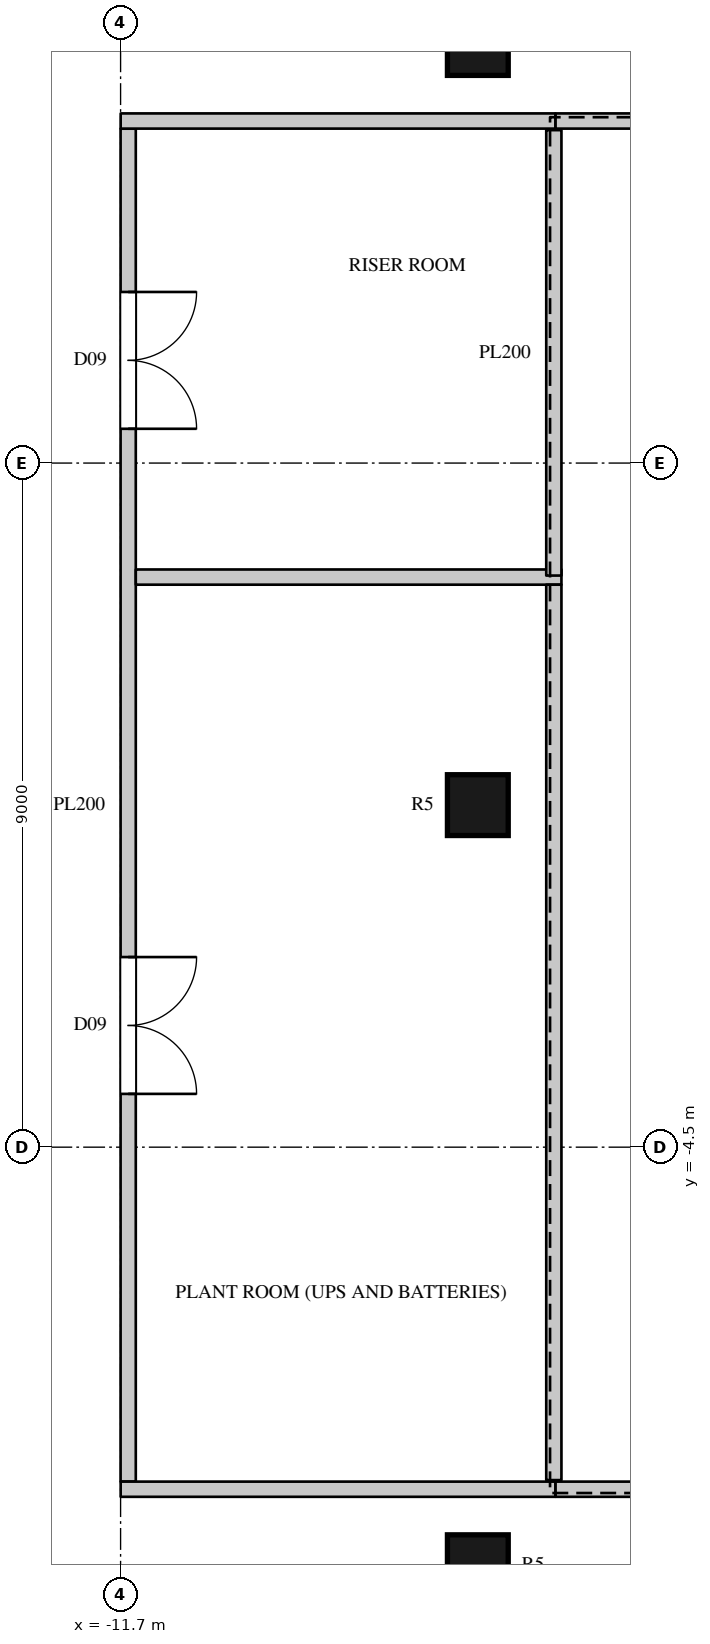
"""IFC4 building model, lengths in metres.
Left out: names, types, materials, properties, quantities, classifications, styles, units other than length and angle.
Written with IfcOpenShell. Run it as: python <this file> out.ifc"""

import sys

from ifc_helpers import new_model, si_unit, direction, frame, frame_2d, origin, origin_2d, place, context, subcontext, project, spatial, rectangle, circle, extrude, element, fill, save


model = new_model("IFC4")
c1 = context("Model", 3, precision=1e-05, world=origin(), true_north=direction((0.0, 1.0)))
c2 = subcontext(c1, "Body", "Model", "MODEL_VIEW")
j1 = project(units=[si_unit("LENGTHUNIT", "METRE"), si_unit("PLANEANGLEUNIT", "RADIAN")], contexts=[c1])
p1 = place(None, origin())
s1 = spatial("IfcSite", under=j1, at=p1, CompositionType="ELEMENT")
p2 = place(p1, origin())
s2 = spatial("IfcBuilding", under=s1, at=p2, CompositionType="ELEMENT")
p3 = place(p2, frame((0.0, 0.0, 351.0)))
s3 = spatial("IfcBuildingStorey", under=s2, at=p3, CompositionType="ELEMENT", Elevation=351.0)
for number, where, z_axis, x_axis in (
    (1, (-7.0, -10.0, 0.0), (0.0, 0.0, 1.0), (1.0, 0.0, 0.0)),
    (2, (-7.0, 0.0, 0.0), (0.0, 0.0, 1.0), (1.0, 0.0, 0.0)),
    (3, (-7.0, 10.0, 0.0), (0.0, 0.0, 1.0), (1.0, 0.0, 0.0)),
):
    element("IfcColumn", number, at=place(p3, frame(where, z_axis=z_axis, x_axis=x_axis)), inside=s3, PredefinedType="COLUMN", context=c2, shape_type="SweptSolid", body=[
        extrude(circle(Radius=0.4, at=origin_2d()), origin(), (0.0, 0.0, 1.0), 4.0),
    ])
for number, where, z_axis, x_axis in (
    (4, (-5.98, -9.0, 0.0), (0.0, 0.0, 1.0), (1.0, 0.0, 0.0)),
    (5, (-5.98, 9.0, 0.0), (0.0, 0.0, 1.0), (1.0, 0.0, 0.0)),
):
    element("IfcWall", number, at=place(p3, frame(where, z_axis=z_axis, x_axis=x_axis)), inside=s3, PredefinedType="PARTITIONING", context=c2, shape_type="SweptSolid", body=[
        extrude(rectangle(XDim=13.96, YDim=0.2, at=frame_2d((6.98, 0.0))), origin(), (0.0, 0.0, 1.0), 3.598),
    ])
p4 = place(p3, frame((-11.6, -8.899, 0.0), z_axis=(0.0, 0.0, 1.0), x_axis=(0.0, 1.0, 0.0)))
e6 = element("IfcWall", 6, at=p4, inside=s3, PredefinedType="PARTITIONING", context=c2, shape_type="SweptSolid", body=[
    extrude(rectangle(XDim=17.798, YDim=0.2, at=frame_2d((8.899, 0.0))), origin(), (0.0, 0.0, 1.0), 3.598),
])
p5 = place(p4, frame((5.1, 0.0, 0.0)))
e7 = element("IfcOpeningElement", 7, at=p5, cuts=e6, PredefinedType="OPENING", context=c2, shape_type="SweptSolid", body=[
    extrude(rectangle(XDim=1.8, YDim=2.4, at=frame_2d((0.9, 1.2))), frame((0.0, 0.11, 0.0), z_axis=(0.0, -1.0, 0.0), x_axis=(1.0, 0.0, 0.0)), (0.0, 0.0, 1.0), 0.22),
])
p6 = place(p4, frame((13.85, 0.0, 0.0)))
e8 = element("IfcOpeningElement", 8, at=p6, cuts=e6, PredefinedType="OPENING", context=c2, shape_type="SweptSolid", body=[
    extrude(rectangle(XDim=1.8, YDim=2.4, at=frame_2d((0.9, 1.2))), frame((0.0, 0.11, 0.0), z_axis=(0.0, -1.0, 0.0), x_axis=(1.0, 0.0, 0.0)), (0.0, 0.0, 1.0), 0.22),
])
p7 = place(p3, frame((-11.5, 3.0, 0.0), z_axis=(0.0, 0.0, 1.0), x_axis=(1.0, 0.0, 0.0)))
e9 = element("IfcWall", 9, at=p7, inside=s3, PredefinedType="PARTITIONING", context=c2, shape_type="SweptSolid", body=[
    extrude(rectangle(XDim=5.6, YDim=0.2, at=frame_2d((2.8, 0.0))), origin(), (0.0, 0.0, 1.0), 3.598),
])
for number, where, z_axis, x_axis in (
    (10, (-11.699, -9.0, 0.0), (0.0, 0.0, 1.0), (1.0, 0.0, 0.0)),
    (11, (-11.699, 9.0, 0.0), (0.0, 0.0, 1.0), (1.0, 0.0, 0.0)),
):
    element("IfcWall", number, at=place(p3, frame(where, z_axis=z_axis, x_axis=x_axis)), inside=s3, PredefinedType="PARTITIONING", context=c2, shape_type="SweptSolid", body=[
        extrude(rectangle(XDim=5.719, YDim=0.2, at=frame_2d((2.859, 0.0))), origin(), (0.0, 0.0, 1.0), 3.598),
    ])
p8 = place(p3, frame((-6.0, -8.88, 0.0), z_axis=(0.0, 0.0, 1.0), x_axis=(0.0, 1.0, 0.0)))
e12 = element("IfcWall", 12, at=p8, inside=s3, PredefinedType="PARTITIONING", context=c2, shape_type="SweptSolid", body=[
    extrude(rectangle(XDim=11.78, YDim=0.2, at=frame_2d((5.89, 0.0))), origin(), (0.0, 0.0, 1.0), 3.598),
])
p9 = place(p3, frame((-6.0, 3.02, 0.0), z_axis=(0.0, 0.0, 1.0), x_axis=(0.0, 1.0, 0.0)))
e13 = element("IfcWall", 13, at=p9, inside=s3, PredefinedType="PARTITIONING", context=c2, shape_type="SweptSolid", body=[
    extrude(rectangle(XDim=5.86, YDim=0.2, at=frame_2d((2.93, 0.0))), origin(), (0.0, 0.0, 1.0), 3.598),
])
p10 = place(p5, origin())
e14 = element("IfcDoor", 14, at=p10, inside=s3, OperationType="DOUBLE_DOOR_SINGLE_SWING", PredefinedType="DOOR", context=c2, shape_type="SweptSolid", body=[
    extrude(rectangle(XDim=1.8, YDim=2.4, at=frame_2d((0.9, 1.2))), frame((0.0, 0.025, 0.0), z_axis=(0.0, -1.0, 0.0), x_axis=(1.0, 0.0, 0.0)), (0.0, 0.0, 1.0), 0.05),
])
fill(e7, e14)
p11 = place(p6, origin())
e15 = element("IfcDoor", 15, at=p11, inside=s3, OperationType="DOUBLE_DOOR_SINGLE_SWING", PredefinedType="DOOR", context=c2, shape_type="SweptSolid", body=[
    extrude(rectangle(XDim=1.8, YDim=2.4, at=frame_2d((0.9, 1.2))), frame((0.0, 0.025, 0.0), z_axis=(0.0, -1.0, 0.0), x_axis=(1.0, 0.0, 0.0)), (0.0, 0.0, 1.0), 0.05),
])
fill(e8, e15)
save(model, sys.argv[1])
